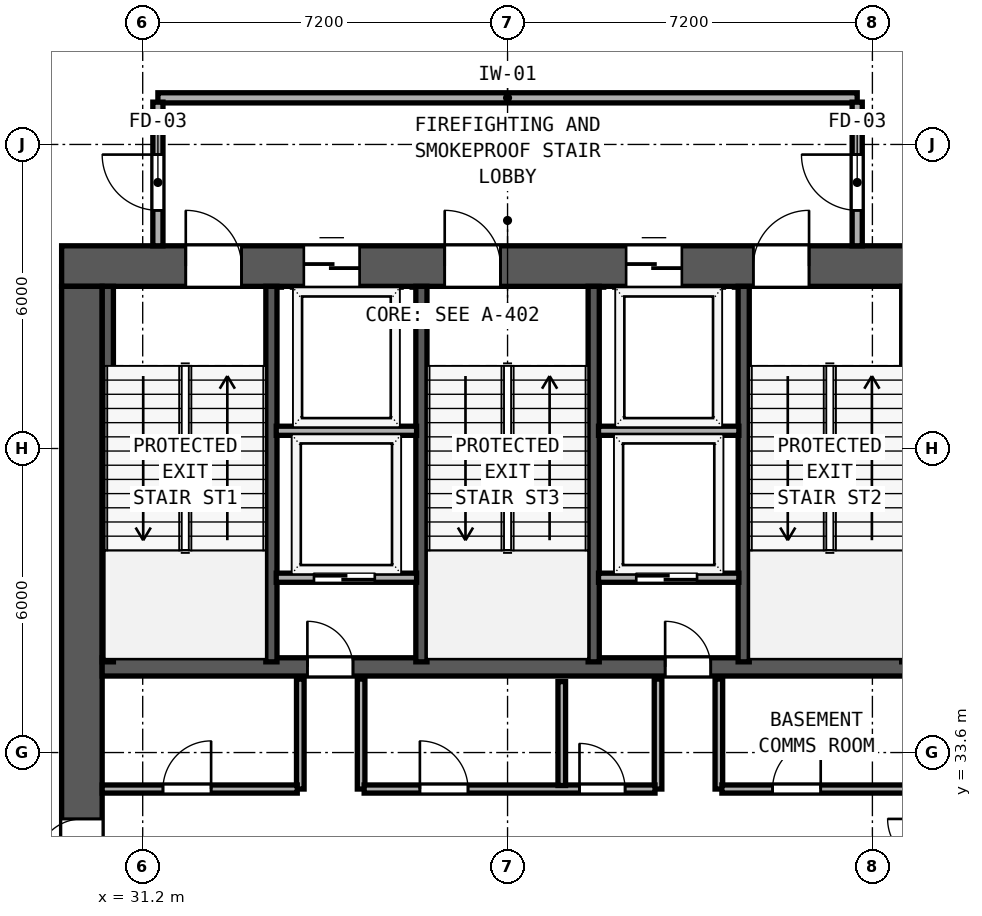
"""IFC4 building model, lengths in metres.
Left out: names, types, materials, properties, quantities, classifications, styles, units other than length and angle.
Written with IfcOpenShell. Run it as: python <this file> out.ifc"""

import sys

from ifc_helpers import new_model, si_unit, direction, frame, frame_2d, origin, place, context, subcontext, project, spatial, rectangle, extrude, element, fill, save


model = new_model("IFC4")
c1 = context("Model", 3, precision=1e-05, world=origin(), true_north=direction((0.0, 1.0)))
c2 = subcontext(c1, "Body", "Model", "MODEL_VIEW")
j1 = project(units=[si_unit("LENGTHUNIT", "METRE"), si_unit("PLANEANGLEUNIT", "RADIAN")], contexts=[c1])
p1 = place(None, origin())
s1 = spatial("IfcSite", under=j1, at=p1, CompositionType="ELEMENT")
p2 = place(p1, origin())
s2 = spatial("IfcBuilding", under=s1, at=p2, CompositionType="ELEMENT")
p3 = place(p2, frame((0.0, 0.0, -4.8)))
s3 = spatial("IfcBuildingStorey", under=s2, at=p3, CompositionType="ELEMENT", Elevation=-4.8)
p4 = place(p3, frame((29.6, 43.2, 0.0), z_axis=(0.0, 0.0, 1.0), x_axis=(1.0, 0.0, 0.0)))
e1 = element("IfcWall", 1, at=p4, inside=s3, PredefinedType="SHEAR", context=c2, shape_type="SweptSolid", body=[
    extrude(rectangle(XDim=17.6, YDim=0.8, at=frame_2d((8.8, 0.0))), origin(), (0.0, 0.0, 1.0), 4.5),
])
p5 = place(p4, frame((2.45, 0.0, 0.0)))
e2 = element("IfcOpeningElement", 2, at=p5, cuts=e1, PredefinedType="OPENING", context=c2, shape_type="SweptSolid", body=[
    extrude(rectangle(XDim=1.1, YDim=2.15, at=frame_2d((0.55, 1.075))), frame((0.0, 0.41, 0.0), z_axis=(0.0, -1.0, 0.0), x_axis=(1.0, 0.0, 0.0)), (0.0, 0.0, 1.0), 0.82),
])
p6 = place(p4, frame((7.56, 0.0, 0.0)))
e3 = element("IfcOpeningElement", 3, at=p6, cuts=e1, PredefinedType="OPENING", context=c2, shape_type="SweptSolid", body=[
    extrude(rectangle(XDim=1.1, YDim=2.15, at=frame_2d((0.55, 1.075))), frame((0.0, 0.41, 0.0), z_axis=(0.0, -1.0, 0.0), x_axis=(1.0, 0.0, 0.0)), (0.0, 0.0, 1.0), 0.82),
])
p7 = place(p4, frame((13.65, 0.0, 0.0)))
e4 = element("IfcOpeningElement", 4, at=p7, cuts=e1, PredefinedType="OPENING", context=c2, shape_type="SweptSolid", body=[
    extrude(rectangle(XDim=1.1, YDim=2.15, at=frame_2d((0.55, 1.075))), frame((0.0, 0.41, 0.0), z_axis=(0.0, -1.0, 0.0), x_axis=(1.0, 0.0, 0.0)), (0.0, 0.0, 1.0), 0.82),
])
p8 = place(p4, frame((4.78, 0.0, 0.0)))
e5 = element("IfcOpeningElement", 5, at=p8, cuts=e1, PredefinedType="OPENING", context=c2, shape_type="SweptSolid", body=[
    extrude(rectangle(XDim=1.1, YDim=2.2, at=frame_2d((0.55, 1.1))), frame((0.0, 0.41, 0.0), z_axis=(0.0, -1.0, 0.0), x_axis=(1.0, 0.0, 0.0)), (0.0, 0.0, 1.0), 0.82),
])
p9 = place(p4, frame((11.14, 0.0, 0.0)))
e6 = element("IfcOpeningElement", 6, at=p9, cuts=e1, PredefinedType="OPENING", context=c2, shape_type="SweptSolid", body=[
    extrude(rectangle(XDim=1.1, YDim=2.2, at=frame_2d((0.55, 1.1))), frame((0.0, 0.41, 0.0), z_axis=(0.0, -1.0, 0.0), x_axis=(1.0, 0.0, 0.0)), (0.0, 0.0, 1.0), 0.82),
])
p10 = place(p3, frame((30.0, 26.8, 0.0), z_axis=(0.0, 0.0, 1.0), x_axis=(0.0, 1.0, 0.0)))
e7 = element("IfcWall", 7, at=p10, inside=s3, PredefinedType="SHEAR", context=c2, shape_type="SweptSolid", body=[
    extrude(rectangle(XDim=16.0, YDim=0.8, at=frame_2d((8.0, 0.0))), origin(), (0.0, 0.0, 1.0), 4.5),
])
p11 = place(p10, frame((4.59, 0.0, 0.0)))
e8 = element("IfcOpeningElement", 8, at=p11, cuts=e7, PredefinedType="OPENING", context=c2, shape_type="SweptSolid", body=[
    extrude(rectangle(XDim=0.9, YDim=2.1, at=frame_2d((0.45, 1.05))), frame((0.0, 0.41, 0.0), z_axis=(0.0, -1.0, 0.0), x_axis=(1.0, 0.0, 0.0)), (0.0, 0.0, 1.0), 0.82),
])
p12 = place(p3, frame((30.4, 35.29, 0.0), z_axis=(0.0, 0.0, 1.0), x_axis=(1.0, 0.0, 0.0)))
e9 = element("IfcWall", 9, at=p12, inside=s3, PredefinedType="SHEAR", context=c2, shape_type="SweptSolid", body=[
    extrude(rectangle(XDim=16.0, YDim=0.36, at=frame_2d((8.0, 0.0))), origin(), (0.0, 0.0, 1.0), 4.5),
])
p13 = place(p12, frame((4.95, 0.0, 0.0), z_axis=(0.0, 0.0, 1.0), x_axis=(-1.0, 0.0, 0.0)))
e10 = element("IfcOpeningElement", 10, at=p13, cuts=e9, PredefinedType="OPENING", context=c2, shape_type="SweptSolid", body=[
    extrude(rectangle(XDim=0.9, YDim=2.1, at=frame_2d((0.45, 1.05))), frame((0.0, 0.19, 0.0), z_axis=(0.0, -1.0, 0.0), x_axis=(1.0, 0.0, 0.0)), (0.0, 0.0, 1.0), 0.38),
])
p14 = place(p12, frame((12.01, 0.0, 0.0), z_axis=(0.0, 0.0, 1.0), x_axis=(-1.0, 0.0, 0.0)))
e11 = element("IfcOpeningElement", 11, at=p14, cuts=e9, PredefinedType="OPENING", context=c2, shape_type="SweptSolid", body=[
    extrude(rectangle(XDim=0.9, YDim=2.1, at=frame_2d((0.45, 1.05))), frame((0.0, 0.19, 0.0), z_axis=(0.0, -1.0, 0.0), x_axis=(1.0, 0.0, 0.0)), (0.0, 0.0, 1.0), 0.38),
])
for number, where, z_axis, x_axis in (
    (12, (30.512, 35.39, 0.0), (0.0, 0.0, 1.0), (0.0, 1.0, 0.0)),
    (13, (33.74, 35.39, 0.0), (0.0, 0.0, 1.0), (0.0, 1.0, 0.0)),
    (14, (36.7, 35.39, 0.0), (0.0, 0.0, 1.0), (0.0, 1.0, 0.0)),
    (15, (40.1, 35.39, 0.0), (0.0, 0.0, 1.0), (0.0, 1.0, 0.0)),
    (16, (43.06, 35.39, 0.0), (0.0, 0.0, 1.0), (0.0, 1.0, 0.0)),
    (17, (46.288, 35.39, 0.0), (0.0, 0.0, 1.0), (0.0, 1.0, 0.0)),
):
    element("IfcWall", number, at=place(p3, frame(where, z_axis=z_axis, x_axis=x_axis)), inside=s3, PredefinedType="SHEAR", context=c2, shape_type="SweptSolid", body=[
        extrude(rectangle(XDim=7.41, YDim=0.22, at=frame_2d((3.705, 0.0))), origin(), (0.0, 0.0, 1.0), 4.5),
    ])
p15 = place(p3, frame((31.5, 46.52, 0.0), z_axis=(0.0, 0.0, 1.0), x_axis=(1.0, 0.0, 0.0)))
e18 = element("IfcWall", 18, at=p15, inside=s3, PredefinedType="SOLIDWALL", context=c2, shape_type="SweptSolid", body=[
    extrude(rectangle(XDim=13.8, YDim=0.2, at=frame_2d((6.9, 0.0))), origin(), (0.0, 0.0, 1.0), 4.5),
])
p16 = place(p3, frame((31.5, 43.6, 0.0), z_axis=(0.0, 0.0, 1.0), x_axis=(0.0, 1.0, 0.0)))
e19 = element("IfcWall", 19, at=p16, inside=s3, PredefinedType="SOLIDWALL", context=c2, shape_type="SweptSolid", body=[
    extrude(rectangle(XDim=2.835, YDim=0.2, at=frame_2d((1.417, 0.0))), origin(), (0.0, 0.0, 1.0), 4.5),
])
p17 = place(p16, frame((1.8, 0.0, 0.0), z_axis=(0.0, 0.0, 1.0), x_axis=(-1.0, 0.0, 0.0)))
e20 = element("IfcOpeningElement", 20, at=p17, cuts=e19, PredefinedType="OPENING", context=c2, shape_type="SweptSolid", body=[
    extrude(rectangle(XDim=1.1, YDim=2.15, at=frame_2d((0.55, 1.075))), frame((0.0, 0.11, 0.0), z_axis=(0.0, -1.0, 0.0), x_axis=(1.0, 0.0, 0.0)), (0.0, 0.0, 1.0), 0.22),
])
p18 = place(p3, frame((45.3, 43.6, 0.0), z_axis=(0.0, 0.0, 1.0), x_axis=(0.0, 1.0, 0.0)))
e21 = element("IfcWall", 21, at=p18, inside=s3, PredefinedType="SOLIDWALL", context=c2, shape_type="SweptSolid", body=[
    extrude(rectangle(XDim=2.835, YDim=0.2, at=frame_2d((1.417, 0.0))), origin(), (0.0, 0.0, 1.0), 4.5),
])
p19 = place(p18, frame((0.7, 0.0, 0.0)))
e22 = element("IfcOpeningElement", 22, at=p19, cuts=e21, PredefinedType="OPENING", context=c2, shape_type="SweptSolid", body=[
    extrude(rectangle(XDim=1.1, YDim=2.15, at=frame_2d((0.55, 1.075))), frame((0.0, 0.11, 0.0), z_axis=(0.0, -1.0, 0.0), x_axis=(1.0, 0.0, 0.0)), (0.0, 0.0, 1.0), 0.22),
])
for number, where, z_axis, x_axis in (
    (23, (33.835, 39.95, 0.0), (0.0, 0.0, 1.0), (1.0, 0.0, 0.0)),
    (24, (40.195, 39.95, 0.0), (0.0, 0.0, 1.0), (1.0, 0.0, 0.0)),
):
    element("IfcWall", number, at=place(p3, frame(where, z_axis=z_axis, x_axis=x_axis)), inside=s3, PredefinedType="SOLIDWALL", context=c2, shape_type="SweptSolid", body=[
        extrude(rectangle(XDim=2.77, YDim=0.18, at=frame_2d((1.385, 0.0))), origin(), (0.0, 0.0, 1.0), 4.5),
    ])
p20 = place(p3, frame((33.835, 37.05, 0.0), z_axis=(0.0, 0.0, 1.0), x_axis=(1.0, 0.0, 0.0)))
e25 = element("IfcWall", 25, at=p20, inside=s3, PredefinedType="SOLIDWALL", context=c2, shape_type="SweptSolid", body=[
    extrude(rectangle(XDim=2.77, YDim=0.18, at=frame_2d((1.385, 0.0))), origin(), (0.0, 0.0, 1.0), 4.5),
])
p21 = place(p20, frame((1.945, 0.0, 0.0), z_axis=(0.0, 0.0, 1.0), x_axis=(-1.0, 0.0, 0.0)))
e26 = element("IfcOpeningElement", 26, at=p21, cuts=e25, PredefinedType="OPENING", context=c2, shape_type="SweptSolid", body=[
    extrude(rectangle(XDim=1.2, YDim=2.2, at=frame_2d((0.6, 1.1))), frame((0.0, 0.1, 0.0), z_axis=(0.0, -1.0, 0.0), x_axis=(1.0, 0.0, 0.0)), (0.0, 0.0, 1.0), 0.2),
])
for number, where, z_axis, x_axis in (
    (27, (34.31, 32.88, 0.0), (0.0, 0.0, 1.0), (0.0, 1.0, 0.0)),
    (28, (35.51, 32.88, 0.0), (0.0, 0.0, 1.0), (0.0, 1.0, 0.0)),
):
    element("IfcWall", number, at=place(p3, frame(where, z_axis=z_axis, x_axis=x_axis)), inside=s3, PredefinedType="SOLIDWALL", context=c2, shape_type="SweptSolid", body=[
        extrude(rectangle(XDim=2.17, YDim=0.15, at=frame_2d((1.085, 0.0))), origin(), (0.0, 0.0, 1.0), 4.5),
    ])
p22 = place(p3, frame((40.195, 37.05, 0.0), z_axis=(0.0, 0.0, 1.0), x_axis=(1.0, 0.0, 0.0)))
e29 = element("IfcWall", 29, at=p22, inside=s3, PredefinedType="SOLIDWALL", context=c2, shape_type="SweptSolid", body=[
    extrude(rectangle(XDim=2.77, YDim=0.18, at=frame_2d((1.385, 0.0))), origin(), (0.0, 0.0, 1.0), 4.5),
])
p23 = place(p22, frame((1.945, 0.0, 0.0), z_axis=(0.0, 0.0, 1.0), x_axis=(-1.0, 0.0, 0.0)))
e30 = element("IfcOpeningElement", 30, at=p23, cuts=e29, PredefinedType="OPENING", context=c2, shape_type="SweptSolid", body=[
    extrude(rectangle(XDim=1.2, YDim=2.2, at=frame_2d((0.6, 1.1))), frame((0.0, 0.1, 0.0), z_axis=(0.0, -1.0, 0.0), x_axis=(1.0, 0.0, 0.0)), (0.0, 0.0, 1.0), 0.2),
])
for number, where, z_axis, x_axis in (
    (31, (41.37, 32.88, 0.0), (0.0, 0.0, 1.0), (0.0, 1.0, 0.0)),
    (32, (42.57, 32.88, 0.0), (0.0, 0.0, 1.0), (0.0, 1.0, 0.0)),
):
    element("IfcWall", number, at=place(p3, frame(where, z_axis=z_axis, x_axis=x_axis)), inside=s3, PredefinedType="SOLIDWALL", context=c2, shape_type="SweptSolid", body=[
        extrude(rectangle(XDim=2.17, YDim=0.15, at=frame_2d((1.085, 0.0))), origin(), (0.0, 0.0, 1.0), 4.5),
    ])
p24 = place(p3, frame((30.4, 32.88, 0.0), z_axis=(0.0, 0.0, 1.0), x_axis=(1.0, 0.0, 0.0)))
e33 = element("IfcWall", 33, at=p24, inside=s3, PredefinedType="SOLIDWALL", context=c2, shape_type="SweptSolid", body=[
    extrude(rectangle(XDim=3.85, YDim=0.16, at=frame_2d((1.925, 0.0))), origin(), (0.0, 0.0, 1.0), 4.5),
])
p25 = place(p24, frame((2.15, 0.0, 0.0), z_axis=(0.0, 0.0, 1.0), x_axis=(-1.0, 0.0, 0.0)))
e34 = element("IfcOpeningElement", 34, at=p25, cuts=e33, PredefinedType="OPENING", context=c2, shape_type="SweptSolid", body=[
    extrude(rectangle(XDim=0.95, YDim=2.12, at=frame_2d((0.475, 1.06))), frame((0.0, 0.09, 0.0), z_axis=(0.0, -1.0, 0.0), x_axis=(1.0, 0.0, 0.0)), (0.0, 0.0, 1.0), 0.18),
])
p26 = place(p3, frame((35.57, 32.88, 0.0), z_axis=(0.0, 0.0, 1.0), x_axis=(1.0, 0.0, 0.0)))
e35 = element("IfcWall", 35, at=p26, inside=s3, PredefinedType="SOLIDWALL", context=c2, shape_type="SweptSolid", body=[
    extrude(rectangle(XDim=5.74, YDim=0.16, at=frame_2d((2.87, 0.0))), origin(), (0.0, 0.0, 1.0), 4.5),
])
p27 = place(p26, frame((2.05, 0.0, 0.0), z_axis=(0.0, 0.0, 1.0), x_axis=(-1.0, 0.0, 0.0)))
e36 = element("IfcOpeningElement", 36, at=p27, cuts=e35, PredefinedType="OPENING", context=c2, shape_type="SweptSolid", body=[
    extrude(rectangle(XDim=0.95, YDim=2.12, at=frame_2d((0.475, 1.06))), frame((0.0, 0.09, 0.0), z_axis=(0.0, -1.0, 0.0), x_axis=(1.0, 0.0, 0.0)), (0.0, 0.0, 1.0), 0.18),
])
p28 = place(p26, frame((5.15, 0.0, 0.0), z_axis=(0.0, 0.0, 1.0), x_axis=(-1.0, 0.0, 0.0)))
e37 = element("IfcOpeningElement", 37, at=p28, cuts=e35, PredefinedType="OPENING", context=c2, shape_type="SweptSolid", body=[
    extrude(rectangle(XDim=0.9, YDim=2.1, at=frame_2d((0.45, 1.05))), frame((0.0, 0.09, 0.0), z_axis=(0.0, -1.0, 0.0), x_axis=(1.0, 0.0, 0.0)), (0.0, 0.0, 1.0), 0.18),
])
p29 = place(p3, frame((42.63, 32.88, 0.0), z_axis=(0.0, 0.0, 1.0), x_axis=(1.0, 0.0, 0.0)))
e38 = element("IfcWall", 38, at=p29, inside=s3, PredefinedType="SOLIDWALL", context=c2, shape_type="SweptSolid", body=[
    extrude(rectangle(XDim=3.77, YDim=0.16, at=frame_2d((1.885, 0.0))), origin(), (0.0, 0.0, 1.0), 4.5),
])
p30 = place(p29, frame((1.95, 0.0, 0.0), z_axis=(0.0, 0.0, 1.0), x_axis=(-1.0, 0.0, 0.0)))
e39 = element("IfcOpeningElement", 39, at=p30, cuts=e38, PredefinedType="OPENING", context=c2, shape_type="SweptSolid", body=[
    extrude(rectangle(XDim=0.95, YDim=2.12, at=frame_2d((0.475, 1.06))), frame((0.0, 0.09, 0.0), z_axis=(0.0, -1.0, 0.0), x_axis=(1.0, 0.0, 0.0)), (0.0, 0.0, 1.0), 0.18),
])
p31 = place(p3, frame((39.47, 32.95, 0.0), z_axis=(0.0, 0.0, 1.0), x_axis=(0.0, 1.0, 0.0)))
e40 = element("IfcWall", 40, at=p31, inside=s3, PredefinedType="SOLIDWALL", context=c2, shape_type="SweptSolid", body=[
    extrude(rectangle(XDim=2.05, YDim=0.15, at=frame_2d((1.025, 0.0))), origin(), (0.0, 0.0, 1.0), 4.5),
])
p32 = place(p5, origin())
e41 = element("IfcDoor", 41, at=p32, inside=s3, OperationType="SINGLE_SWING_LEFT", PredefinedType="DOOR", context=c2, shape_type="SweptSolid", body=[
    extrude(rectangle(XDim=1.1, YDim=2.15, at=frame_2d((0.55, 1.075))), frame((0.0, 0.185, 0.0), z_axis=(0.0, -1.0, 0.0), x_axis=(1.0, 0.0, 0.0)), (0.0, 0.0, 1.0), 0.05),
])
fill(e2, e41)
p33 = place(p6, origin())
e42 = element("IfcDoor", 42, at=p33, inside=s3, OperationType="SINGLE_SWING_LEFT", PredefinedType="DOOR", context=c2, shape_type="SweptSolid", body=[
    extrude(rectangle(XDim=1.1, YDim=2.15, at=frame_2d((0.55, 1.075))), frame((0.0, 0.185, 0.0), z_axis=(0.0, -1.0, 0.0), x_axis=(1.0, 0.0, 0.0)), (0.0, 0.0, 1.0), 0.05),
])
fill(e3, e42)
p34 = place(p7, origin())
e43 = element("IfcDoor", 43, at=p34, inside=s3, OperationType="SINGLE_SWING_RIGHT", PredefinedType="DOOR", context=c2, shape_type="SweptSolid", body=[
    extrude(rectangle(XDim=1.1, YDim=2.15, at=frame_2d((0.55, 1.075))), frame((0.0, 0.185, 0.0), z_axis=(0.0, -1.0, 0.0), x_axis=(1.0, 0.0, 0.0)), (0.0, 0.0, 1.0), 0.05),
])
fill(e4, e43)
p35 = place(p17, origin())
e44 = element("IfcDoor", 44, at=p35, inside=s3, OperationType="SINGLE_SWING_LEFT", PredefinedType="DOOR", context=c2, shape_type="SweptSolid", body=[
    extrude(rectangle(XDim=1.1, YDim=2.15, at=frame_2d((0.55, 1.075))), frame((0.0, 0.025, 0.0), z_axis=(0.0, -1.0, 0.0), x_axis=(1.0, 0.0, 0.0)), (0.0, 0.0, 1.0), 0.05),
])
fill(e20, e44)
p36 = place(p19, origin())
e45 = element("IfcDoor", 45, at=p36, inside=s3, OperationType="SINGLE_SWING_RIGHT", PredefinedType="DOOR", context=c2, shape_type="SweptSolid", body=[
    extrude(rectangle(XDim=1.1, YDim=2.15, at=frame_2d((0.55, 1.075))), frame((0.0, 0.025, 0.0), z_axis=(0.0, -1.0, 0.0), x_axis=(1.0, 0.0, 0.0)), (0.0, 0.0, 1.0), 0.05),
])
fill(e22, e45)
p37 = place(p8, origin())
e46 = element("IfcDoor", 46, at=p37, inside=s3, OperationType="SLIDING_TO_LEFT", PredefinedType="DOOR", context=c2, shape_type="SweptSolid", body=[
    extrude(rectangle(XDim=1.1, YDim=2.2, at=frame_2d((0.55, 1.1))), frame((0.0, 0.185, 0.0), z_axis=(0.0, -1.0, 0.0), x_axis=(1.0, 0.0, 0.0)), (0.0, 0.0, 1.0), 0.05),
])
fill(e5, e46)
p38 = place(p9, origin())
e47 = element("IfcDoor", 47, at=p38, inside=s3, OperationType="SLIDING_TO_LEFT", PredefinedType="DOOR", context=c2, shape_type="SweptSolid", body=[
    extrude(rectangle(XDim=1.1, YDim=2.2, at=frame_2d((0.55, 1.1))), frame((0.0, 0.185, 0.0), z_axis=(0.0, -1.0, 0.0), x_axis=(1.0, 0.0, 0.0)), (0.0, 0.0, 1.0), 0.05),
])
fill(e6, e47)
p39 = place(p21, origin())
e48 = element("IfcDoor", 48, at=p39, inside=s3, OperationType="SLIDING_TO_RIGHT", PredefinedType="DOOR", context=c2, shape_type="SweptSolid", body=[
    extrude(rectangle(XDim=1.2, YDim=2.2, at=frame_2d((0.6, 1.1))), frame((0.0, 0.025, 0.0), z_axis=(0.0, -1.0, 0.0), x_axis=(1.0, 0.0, 0.0)), (0.0, 0.0, 1.0), 0.05),
])
fill(e26, e48)
p40 = place(p13, origin())
e49 = element("IfcDoor", 49, at=p40, inside=s3, OperationType="SINGLE_SWING_RIGHT", PredefinedType="DOOR", context=c2, shape_type="SweptSolid", body=[
    extrude(rectangle(XDim=0.9, YDim=2.1, at=frame_2d((0.45, 1.05))), frame((0.0, 0.025, 0.0), z_axis=(0.0, -1.0, 0.0), x_axis=(1.0, 0.0, 0.0)), (0.0, 0.0, 1.0), 0.05),
])
fill(e10, e49)
p41 = place(p23, origin())
e50 = element("IfcDoor", 50, at=p41, inside=s3, OperationType="SLIDING_TO_RIGHT", PredefinedType="DOOR", context=c2, shape_type="SweptSolid", body=[
    extrude(rectangle(XDim=1.2, YDim=2.2, at=frame_2d((0.6, 1.1))), frame((0.0, 0.025, 0.0), z_axis=(0.0, -1.0, 0.0), x_axis=(1.0, 0.0, 0.0)), (0.0, 0.0, 1.0), 0.05),
])
fill(e30, e50)
p42 = place(p14, origin())
e51 = element("IfcDoor", 51, at=p42, inside=s3, OperationType="SINGLE_SWING_RIGHT", PredefinedType="DOOR", context=c2, shape_type="SweptSolid", body=[
    extrude(rectangle(XDim=0.9, YDim=2.1, at=frame_2d((0.45, 1.05))), frame((0.0, 0.025, 0.0), z_axis=(0.0, -1.0, 0.0), x_axis=(1.0, 0.0, 0.0)), (0.0, 0.0, 1.0), 0.05),
])
fill(e11, e51)
p43 = place(p11, origin())
e52 = element("IfcDoor", 52, at=p43, inside=s3, OperationType="SINGLE_SWING_LEFT", PredefinedType="DOOR", context=c2, shape_type="SweptSolid", body=[
    extrude(rectangle(XDim=0.9, YDim=2.1, at=frame_2d((0.45, 1.05))), frame((0.0, 0.025, 0.0), z_axis=(0.0, -1.0, 0.0), x_axis=(1.0, 0.0, 0.0)), (0.0, 0.0, 1.0), 0.05),
])
fill(e8, e52)
p44 = place(p25, origin())
e53 = element("IfcDoor", 53, at=p44, inside=s3, OperationType="SINGLE_SWING_LEFT", PredefinedType="DOOR", context=c2, shape_type="SweptSolid", body=[
    extrude(rectangle(XDim=0.95, YDim=2.12, at=frame_2d((0.475, 1.06))), frame((0.0, 0.025, 0.0), z_axis=(0.0, -1.0, 0.0), x_axis=(1.0, 0.0, 0.0)), (0.0, 0.0, 1.0), 0.05),
])
fill(e34, e53)
p45 = place(p27, origin())
e54 = element("IfcDoor", 54, at=p45, inside=s3, OperationType="SINGLE_SWING_RIGHT", PredefinedType="DOOR", context=c2, shape_type="SweptSolid", body=[
    extrude(rectangle(XDim=0.95, YDim=2.12, at=frame_2d((0.475, 1.06))), frame((0.0, 0.025, 0.0), z_axis=(0.0, -1.0, 0.0), x_axis=(1.0, 0.0, 0.0)), (0.0, 0.0, 1.0), 0.05),
])
fill(e36, e54)
p46 = place(p28, origin())
e55 = element("IfcDoor", 55, at=p46, inside=s3, OperationType="SINGLE_SWING_RIGHT", PredefinedType="DOOR", context=c2, shape_type="SweptSolid", body=[
    extrude(rectangle(XDim=0.9, YDim=2.1, at=frame_2d((0.45, 1.05))), frame((0.0, 0.025, 0.0), z_axis=(0.0, -1.0, 0.0), x_axis=(1.0, 0.0, 0.0)), (0.0, 0.0, 1.0), 0.05),
])
fill(e37, e55)
p47 = place(p30, origin())
e56 = element("IfcDoor", 56, at=p47, inside=s3, OperationType="SINGLE_SWING_LEFT", PredefinedType="DOOR", context=c2, shape_type="SweptSolid", body=[
    extrude(rectangle(XDim=0.95, YDim=2.12, at=frame_2d((0.475, 1.06))), frame((0.0, 0.025, 0.0), z_axis=(0.0, -1.0, 0.0), x_axis=(1.0, 0.0, 0.0)), (0.0, 0.0, 1.0), 0.05),
])
fill(e39, e56)
save(model, sys.argv[1])
